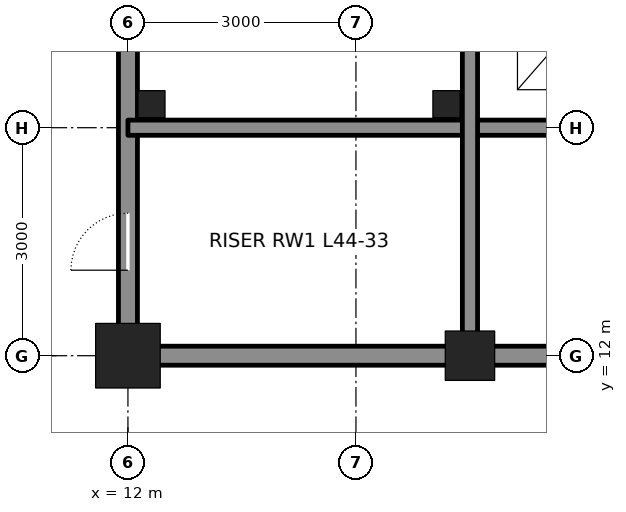
"""IFC4 building model, lengths in metres.
Left out: names, types, materials, properties, quantities, classifications, styles, units other than length and angle.
Written with IfcOpenShell. Run it as: python <this file> out.ifc"""

import sys

from ifc_helpers import new_model, si_unit, direction, frame, frame_2d, origin, origin_2d, place, context, subcontext, project, spatial, rectangle, hollow_rectangle, extrude, element, fill, save


model = new_model("IFC4")
c1 = context("Model", 3, precision=1e-05, world=origin(), true_north=direction((0.0, 1.0)))
c2 = subcontext(c1, "Body", "Model", "MODEL_VIEW")
j1 = project(units=[si_unit("LENGTHUNIT", "METRE"), si_unit("PLANEANGLEUNIT", "RADIAN")], contexts=[c1])
p1 = place(None, origin())
s1 = spatial("IfcSite", under=j1, at=p1, CompositionType="ELEMENT")
p2 = place(p1, origin())
s2 = spatial("IfcBuilding", under=s1, at=p2, CompositionType="ELEMENT")
p3 = place(p2, frame((0.0, 0.0, 201.3)))
s3 = spatial("IfcBuildingStorey", under=s2, at=p3, CompositionType="ELEMENT", Elevation=201.3)
p4 = place(p3, frame((12.0, 12.0, 0.0), z_axis=(0.0, 0.0, 1.0), x_axis=(1.0, 0.0, 0.0)))
e1 = element("IfcColumn", 1, at=p4, inside=s3, PredefinedType="COLUMN", context=c2, shape_type="SweptSolid", body=[
    extrude(hollow_rectangle(XDim=0.85, YDim=0.85, WallThickness=0.085, at=origin_2d()), origin(), (0.0, 0.0, 1.0), 4.2),
])
p5 = place(p3, frame((16.5, 12.0, 0.0), z_axis=(0.0, 0.0, 1.0), x_axis=(1.0, 0.0, 0.0)))
e2 = element("IfcColumn", 2, at=p5, inside=s3, PredefinedType="COLUMN", context=c2, shape_type="SweptSolid", body=[
    extrude(hollow_rectangle(XDim=0.65, YDim=0.65, WallThickness=0.065, at=origin_2d()), origin(), (0.0, 0.0, 1.0), 4.2),
])
p6 = place(p3, frame((12.0, 12.25, 0.0), z_axis=(0.0, 0.0, 1.0), x_axis=(0.0, 1.0, 0.0)))
e3 = element("IfcWall", 3, at=p6, inside=s3, PredefinedType="SOLIDWALL", context=c2, shape_type="SweptSolid", body=[
    extrude(rectangle(XDim=8.5, YDim=0.25, at=frame_2d((4.25, 0.0))), origin(), (0.0, 0.0, 1.0), 3.113),
])
p7 = place(p6, frame((0.875, 0.0, 0.0)))
e4 = element("IfcOpeningElement", 4, at=p7, cuts=e3, PredefinedType="OPENING", context=c2, shape_type="SweptSolid", body=[
    extrude(rectangle(XDim=0.75, YDim=2.1, at=frame_2d((0.375, 1.05))), frame((0.0, 0.135, 0.0), z_axis=(0.0, -1.0, 0.0), x_axis=(1.0, 0.0, 0.0)), (0.0, 0.0, 1.0), 0.27),
])
p8 = place(p3, frame((12.25, 12.0, 0.0), z_axis=(0.0, 0.0, 1.0), x_axis=(1.0, 0.0, 0.0)))
e5 = element("IfcWall", 5, at=p8, inside=s3, PredefinedType="SOLIDWALL", context=c2, shape_type="SweptSolid", body=[
    extrude(rectangle(XDim=4.0, YDim=0.25, at=frame_2d((2.0, 0.0))), origin(), (0.0, 0.0, 1.0), 3.181),
])
p9 = place(p3, frame((16.75, 12.0, 0.0), z_axis=(0.0, 0.0, 1.0), x_axis=(1.0, 0.0, 0.0)))
e6 = element("IfcWall", 6, at=p9, inside=s3, PredefinedType="SOLIDWALL", context=c2, shape_type="SweptSolid", body=[
    extrude(rectangle(XDim=2.5, YDim=0.25, at=frame_2d((1.25, 0.0))), origin(), (0.0, 0.0, 1.0), 3.181),
])
p10 = place(p3, frame((12.0, 15.0, 0.0), z_axis=(0.0, 0.0, 1.0), x_axis=(1.0, 0.0, 0.0)))
e7 = element("IfcWall", 7, at=p10, inside=s3, PredefinedType="SOLIDWALL", context=c2, shape_type="SweptSolid", body=[
    extrude(rectangle(XDim=7.5, YDim=0.2, at=frame_2d((3.75, 0.0))), origin(), (0.0, 0.0, 1.0), 4.04),
])
p11 = place(p3, frame((16.5, 12.25, 0.0), z_axis=(0.0, 0.0, 1.0), x_axis=(0.0, 1.0, 0.0)))
e8 = element("IfcWall", 8, at=p11, inside=s3, PredefinedType="SOLIDWALL", context=c2, shape_type="SweptSolid", body=[
    extrude(rectangle(XDim=8.5, YDim=0.2, at=frame_2d((4.25, 0.0))), origin(), (0.0, 0.0, 1.0), 3.113),
])
for number, where, z_axis, x_axis in (
    (9, (12.31, 15.31, 0.0), (0.0, 0.0, 1.0), (1.0, 0.0, 0.0)),
    (10, (16.19, 15.31, 0.0), (0.0, 0.0, 1.0), (1.0, 0.0, 0.0)),
):
    element("IfcColumn", number, at=place(p3, frame(where, z_axis=z_axis, x_axis=x_axis)), inside=s3, PredefinedType="COLUMN", context=c2, shape_type="SweptSolid", body=[
        extrude(hollow_rectangle(XDim=0.356, YDim=0.356, WallThickness=0.009, at=origin_2d()), origin(), (0.0, 0.0, 1.0), 4.2),
    ])
p12 = place(p7, origin())
e11 = element("IfcDoor", 11, at=p12, inside=s3, OperationType="SINGLE_SWING_LEFT", PredefinedType="DOOR", context=c2, shape_type="SweptSolid", body=[
    extrude(rectangle(XDim=0.75, YDim=2.1, at=frame_2d((0.375, 1.05))), frame((0.0, 0.025, 0.0), z_axis=(0.0, -1.0, 0.0), x_axis=(1.0, 0.0, 0.0)), (0.0, 0.0, 1.0), 0.05),
])
fill(e4, e11)
save(model, sys.argv[1])
